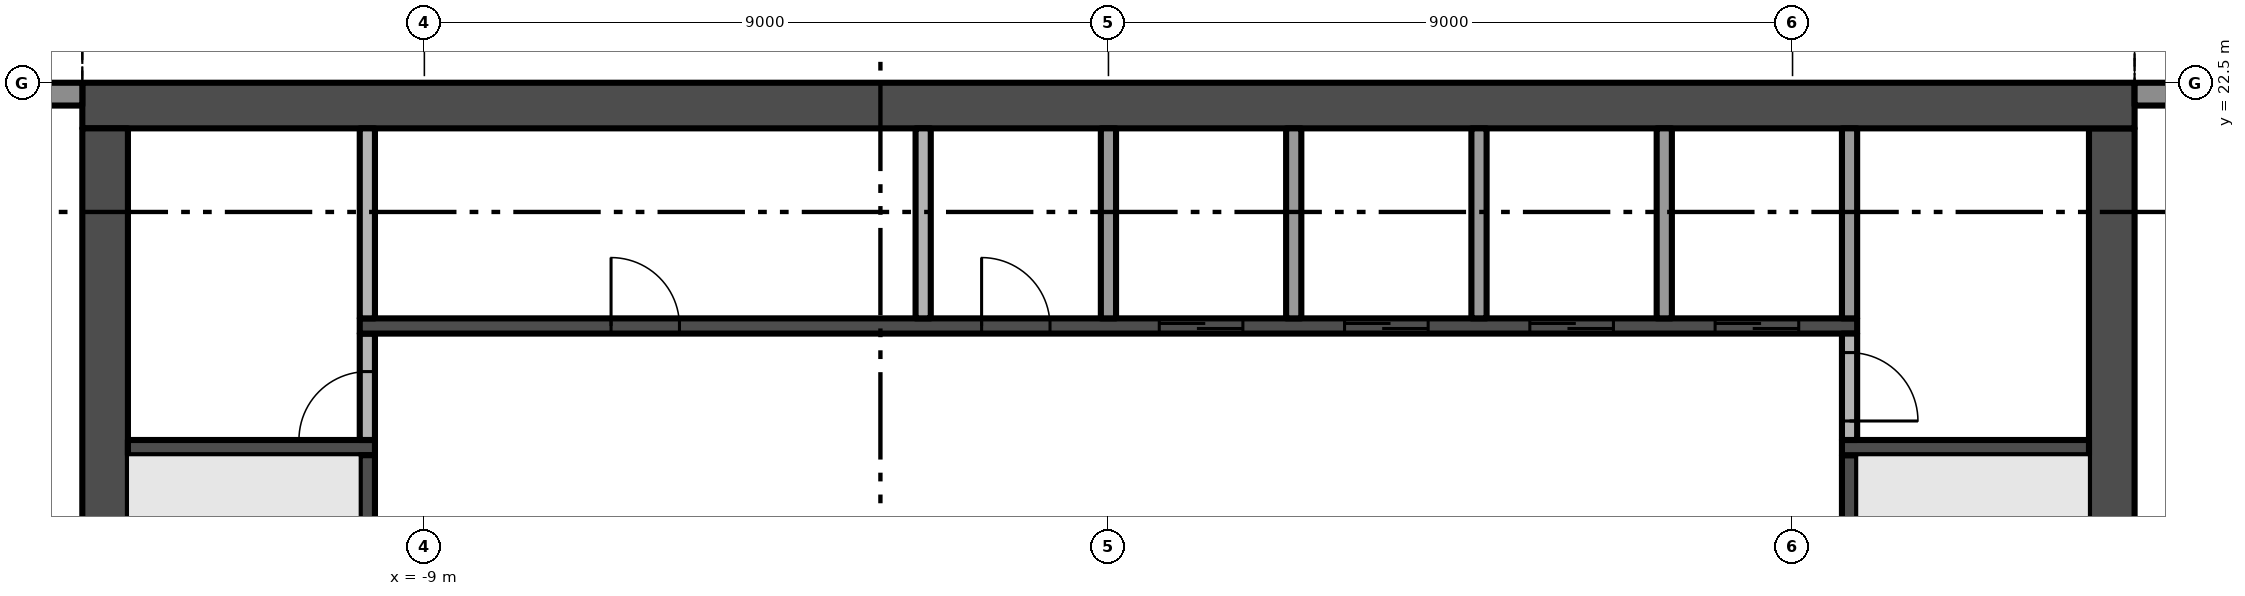
"""IFC4 building model, lengths in metres.
Left out: names, types, materials, properties, quantities, classifications, styles, units other than length and angle.
Written with IfcOpenShell. Run it as: python <this file> out.ifc"""

import sys

from ifc_helpers import new_model, si_unit, direction, frame, frame_2d, origin, place, context, subcontext, project, spatial, polyline, rectangle, outline, extrude, element, fill, save


model = new_model("IFC4")
c1 = context("Model", 3, precision=1e-05, world=origin(), true_north=direction((0.0, 1.0)))
c2 = subcontext(c1, "Body", "Model", "MODEL_VIEW")
j1 = project(units=[si_unit("LENGTHUNIT", "METRE"), si_unit("PLANEANGLEUNIT", "RADIAN")], contexts=[c1])
p1 = place(None, origin())
s1 = spatial("IfcSite", under=j1, at=p1, CompositionType="ELEMENT")
p2 = place(p1, origin())
s2 = spatial("IfcBuilding", under=s1, at=p2, CompositionType="ELEMENT")
p3 = place(p2, frame((0.0, 0.0, 280.6)))
s3 = spatial("IfcBuildingStorey", under=s2, at=p3, CompositionType="ELEMENT", Elevation=280.6)
p4 = place(p3, frame((13.2, 5.1, -0.3), z_axis=(0.0, 0.0, 1.0), x_axis=(0.0, 1.0, 0.0)))
e1 = element("IfcWall", 1, at=p4, inside=s3, PredefinedType="SHEAR", context=c2, shape_type="SweptSolid", body=[
    extrude(rectangle(XDim=16.8, YDim=0.6, at=frame_2d((8.4, 0.0))), origin(), (0.0, 0.0, 1.0), 3.8),
])
p5 = place(p4, frame((6.3, 0.0, 0.3)))
e2 = element("IfcOpeningElement", 2, at=p5, cuts=e1, PredefinedType="OPENING", context=c2, shape_type="SweptSolid", body=[
    extrude(rectangle(XDim=1.2, YDim=2.2, at=frame_2d((0.6, 1.1))), frame((0.0, 0.31, 0.0), z_axis=(0.0, -1.0, 0.0), x_axis=(1.0, 0.0, 0.0)), (0.0, 0.0, 1.0), 0.62),
])
p6 = place(p3, frame((13.5, 22.2, -0.3), z_axis=(0.0, 0.0, 1.0), x_axis=(-1.0, 0.0, 0.0)))
e3 = element("IfcWall", 3, at=p6, inside=s3, PredefinedType="SHEAR", context=c2, shape_type="SweptSolid", body=[
    extrude(rectangle(XDim=27.0, YDim=0.6, at=frame_2d((13.5, 0.0))), origin(), (0.0, 0.0, 1.0), 3.8),
])
p7 = place(p3, frame((-13.2, 21.9, -0.3), z_axis=(0.0, 0.0, 1.0), x_axis=(0.0, -1.0, 0.0)))
e4 = element("IfcWall", 4, at=p7, inside=s3, PredefinedType="SHEAR", context=c2, shape_type="SweptSolid", body=[
    extrude(rectangle(XDim=16.8, YDim=0.6, at=frame_2d((8.4, 0.0))), origin(), (0.0, 0.0, 1.0), 3.8),
])
p8 = place(p7, frame((9.3, 0.0, 0.3)))
e5 = element("IfcOpeningElement", 5, at=p8, cuts=e4, PredefinedType="OPENING", context=c2, shape_type="SweptSolid", body=[
    extrude(rectangle(XDim=1.2, YDim=2.2, at=frame_2d((0.6, 1.1))), frame((0.0, 0.31, 0.0), z_axis=(0.0, -1.0, 0.0), x_axis=(1.0, 0.0, 0.0)), (0.0, 0.0, 1.0), 0.62),
])
p9 = place(p3, frame((13.5, 22.35, 0.0), z_axis=(0.0, 0.0, 1.0), x_axis=(1.0, 0.0, 0.0)))
e6 = element("IfcWall", 6, at=p9, inside=s3, PredefinedType="SOLIDWALL", context=c2, shape_type="SweptSolid", body=[
    extrude(rectangle(XDim=4.05, YDim=0.3, at=frame_2d((2.025, 0.0))), origin(), (0.0, 0.0, 1.0), 3.5),
])
p10 = place(p9, frame((0.55, 0.0, 0.45)))
e7 = element("IfcOpeningElement", 7, at=p10, cuts=e6, PredefinedType="OPENING", context=c2, shape_type="SweptSolid", body=[
    extrude(rectangle(XDim=3.2, YDim=2.65, at=frame_2d((1.6, 1.325))), frame((0.0, 0.16, 0.0), z_axis=(0.0, -1.0, 0.0), x_axis=(1.0, 0.0, 0.0)), (0.0, 0.0, 1.0), 0.32),
])
p11 = place(p3, frame((-17.55, 22.35, 0.0), z_axis=(0.0, 0.0, 1.0), x_axis=(1.0, 0.0, 0.0)))
e8 = element("IfcWall", 8, at=p11, inside=s3, PredefinedType="SOLIDWALL", context=c2, shape_type="SweptSolid", body=[
    extrude(rectangle(XDim=4.05, YDim=0.3, at=frame_2d((2.025, 0.0))), origin(), (0.0, 0.0, 1.0), 3.5),
])
p12 = place(p11, frame((0.3, 0.0, 0.0)))
e9 = element("IfcOpeningElement", 9, at=p12, cuts=e8, PredefinedType="OPENING", context=c2, shape_type="SweptSolid", body=[
    extrude(rectangle(XDim=3.2, YDim=2.4, at=frame_2d((1.6, 1.2))), frame((0.0, 0.16, 0.0), z_axis=(0.0, -1.0, 0.0), x_axis=(1.0, 0.0, 0.0)), (0.0, 0.0, 1.0), 0.32),
])
p13 = place(p3, origin())
e10 = element("IfcWall", 10, at=p13, inside=s3, PredefinedType="USERDEFINED", context=c2, shape_type="SweptSolid", body=[
    extrude(outline(polyline([(22.5, 25.5), (21.0, 25.271), (19.5, 24.671), (18.0, 23.929), (16.5, 23.329), (15.0, 23.1), (13.5, 23.329), (13.462, 23.082), (15.0, 22.847), (16.566, 23.086), (18.102, 23.701), (19.602, 24.442), (21.066, 25.028), (22.538, 25.253), (22.5, 25.5)])), origin(), (0.0, 0.0, 1.0), 0.9),
])
p14 = place(p3, origin())
e11 = element("IfcWall", 11, at=p14, inside=s3, PredefinedType="USERDEFINED", context=c2, shape_type="SweptSolid", body=[
    extrude(outline(polyline([(-13.5, 25.5), (-15.0, 25.271), (-16.5, 24.671), (-18.0, 23.929), (-19.5, 23.329), (-21.0, 23.1), (-22.5, 23.329), (-22.538, 23.082), (-21.0, 22.847), (-19.434, 23.086), (-17.898, 23.701), (-16.398, 24.442), (-14.934, 25.028), (-13.462, 25.253), (-13.5, 25.5)])), origin(), (0.0, 0.0, 1.0), 0.9),
])
p15 = place(p3, frame((-12.9, 17.7, 0.0), z_axis=(0.0, 0.0, 1.0), x_axis=(1.0, 0.0, 0.0)))
e12 = element("IfcWall", 12, at=p15, inside=s3, PredefinedType="SHEAR", context=c2, shape_type="SweptSolid", body=[
    extrude(rectangle(XDim=3.25, YDim=0.2, at=frame_2d((1.625, 0.0))), origin(), (0.0, 0.0, 1.0), 3.5),
])
p16 = place(p3, frame((-9.75, 16.1, 0.0), z_axis=(0.0, 0.0, 1.0), x_axis=(0.0, 1.0, 0.0)))
e13 = element("IfcWall", 13, at=p16, inside=s3, PredefinedType="SHEAR", context=c2, shape_type="SweptSolid", body=[
    extrude(rectangle(XDim=1.5, YDim=0.2, at=frame_2d((0.75, 0.0))), origin(), (0.0, 0.0, 1.0), 3.5),
])
p17 = place(p3, frame((-9.75, 17.8, 0.0), z_axis=(0.0, 0.0, 1.0), x_axis=(0.0, 1.0, 0.0)))
e14 = element("IfcWall", 14, at=p17, inside=s3, PredefinedType="PARTITIONING", context=c2, shape_type="SweptSolid", body=[
    extrude(rectangle(XDim=1.4, YDim=0.2, at=frame_2d((0.7, 0.0))), origin(), (0.0, 0.0, 1.0), 3.5),
])
p18 = place(p17, origin())
e15 = element("IfcOpeningElement", 15, at=p18, cuts=e14, PredefinedType="OPENING", context=c2, shape_type="SweptSolid", body=[
    extrude(rectangle(XDim=0.9, YDim=2.1, at=frame_2d((0.45, 1.05))), frame((0.0, 0.11, 0.0), z_axis=(0.0, -1.0, 0.0), x_axis=(1.0, 0.0, 0.0)), (0.0, 0.0, 1.0), 0.22),
])
p19 = place(p3, frame((-9.85, 19.3, 0.0), z_axis=(0.0, 0.0, 1.0), x_axis=(1.0, 0.0, 0.0)))
e16 = element("IfcWall", 16, at=p19, inside=s3, PredefinedType="SHEAR", context=c2, shape_type="SweptSolid", body=[
    extrude(rectangle(XDim=19.7, YDim=0.2, at=frame_2d((9.85, 0.0))), origin(), (0.0, 0.0, 1.0), 3.5),
])
p20 = place(p19, frame((10.519, 0.0, 0.0)))
e17 = element("IfcOpeningElement", 17, at=p20, cuts=e16, PredefinedType="OPENING", context=c2, shape_type="SweptSolid", body=[
    extrude(rectangle(XDim=1.1, YDim=2.1, at=frame_2d((0.55, 1.05))), frame((0.0, 0.11, 0.0), z_axis=(0.0, -1.0, 0.0), x_axis=(1.0, 0.0, 0.0)), (0.0, 0.0, 1.0), 0.22),
])
p21 = place(p19, frame((12.956, 0.0, 0.0)))
e18 = element("IfcOpeningElement", 18, at=p21, cuts=e16, PredefinedType="OPENING", context=c2, shape_type="SweptSolid", body=[
    extrude(rectangle(XDim=1.1, YDim=2.1, at=frame_2d((0.55, 1.05))), frame((0.0, 0.11, 0.0), z_axis=(0.0, -1.0, 0.0), x_axis=(1.0, 0.0, 0.0)), (0.0, 0.0, 1.0), 0.22),
])
p22 = place(p19, frame((15.394, 0.0, 0.0)))
e19 = element("IfcOpeningElement", 19, at=p22, cuts=e16, PredefinedType="OPENING", context=c2, shape_type="SweptSolid", body=[
    extrude(rectangle(XDim=1.1, YDim=2.1, at=frame_2d((0.55, 1.05))), frame((0.0, 0.11, 0.0), z_axis=(0.0, -1.0, 0.0), x_axis=(1.0, 0.0, 0.0)), (0.0, 0.0, 1.0), 0.22),
])
p23 = place(p19, frame((17.831, 0.0, 0.0)))
e20 = element("IfcOpeningElement", 20, at=p23, cuts=e16, PredefinedType="OPENING", context=c2, shape_type="SweptSolid", body=[
    extrude(rectangle(XDim=1.1, YDim=2.1, at=frame_2d((0.55, 1.05))), frame((0.0, 0.11, 0.0), z_axis=(0.0, -1.0, 0.0), x_axis=(1.0, 0.0, 0.0)), (0.0, 0.0, 1.0), 0.22),
])
p24 = place(p19, frame((3.306, 0.0, 0.0)))
e21 = element("IfcOpeningElement", 21, at=p24, cuts=e16, PredefinedType="OPENING", context=c2, shape_type="SweptSolid", body=[
    extrude(rectangle(XDim=0.9, YDim=2.1, at=frame_2d((0.45, 1.05))), frame((0.0, 0.11, 0.0), z_axis=(0.0, -1.0, 0.0), x_axis=(1.0, 0.0, 0.0)), (0.0, 0.0, 1.0), 0.22),
])
p25 = place(p19, frame((8.181, 0.0, 0.0)))
e22 = element("IfcOpeningElement", 22, at=p25, cuts=e16, PredefinedType="OPENING", context=c2, shape_type="SweptSolid", body=[
    extrude(rectangle(XDim=0.9, YDim=2.1, at=frame_2d((0.45, 1.05))), frame((0.0, 0.11, 0.0), z_axis=(0.0, -1.0, 0.0), x_axis=(1.0, 0.0, 0.0)), (0.0, 0.0, 1.0), 0.22),
])
for number, where, z_axis, x_axis in (
    (23, (-9.75, 19.4, 0.0), (0.0, 0.0, 1.0), (0.0, 1.0, 0.0)),
    (24, (-2.438, 19.4, 0.0), (0.0, 0.0, 1.0), (0.0, 1.0, 0.0)),
    (25, (0.0, 19.4, 0.0), (0.0, 0.0, 1.0), (0.0, 1.0, 0.0)),
    (26, (2.438, 19.4, 0.0), (0.0, 0.0, 1.0), (0.0, 1.0, 0.0)),
    (27, (4.875, 19.4, 0.0), (0.0, 0.0, 1.0), (0.0, 1.0, 0.0)),
    (28, (7.312, 19.4, 0.0), (0.0, 0.0, 1.0), (0.0, 1.0, 0.0)),
):
    element("IfcWall", number, at=place(p3, frame(where, z_axis=z_axis, x_axis=x_axis)), inside=s3, PredefinedType="PARTITIONING", context=c2, shape_type="SweptSolid", body=[
        extrude(rectangle(XDim=2.5, YDim=0.2, at=frame_2d((1.25, 0.0))), origin(), (0.0, 0.0, 1.0), 3.5),
    ])
p26 = place(p3, frame((9.75, 16.1, 0.0), z_axis=(0.0, 0.0, 1.0), x_axis=(0.0, 1.0, 0.0)))
e29 = element("IfcWall", 29, at=p26, inside=s3, PredefinedType="SHEAR", context=c2, shape_type="SweptSolid", body=[
    extrude(rectangle(XDim=1.5, YDim=0.2, at=frame_2d((0.75, 0.0))), origin(), (0.0, 0.0, 1.0), 3.5),
])
p27 = place(p3, frame((9.65, 17.7, 0.0), z_axis=(0.0, 0.0, 1.0), x_axis=(1.0, 0.0, 0.0)))
e30 = element("IfcWall", 30, at=p27, inside=s3, PredefinedType="SHEAR", context=c2, shape_type="SweptSolid", body=[
    extrude(rectangle(XDim=3.25, YDim=0.2, at=frame_2d((1.625, 0.0))), origin(), (0.0, 0.0, 1.0), 3.5),
])
p28 = place(p3, frame((9.75, 19.2, 0.0), z_axis=(0.0, 0.0, 1.0), x_axis=(0.0, -1.0, 0.0)))
e31 = element("IfcWall", 31, at=p28, inside=s3, PredefinedType="PARTITIONING", context=c2, shape_type="SweptSolid", body=[
    extrude(rectangle(XDim=1.4, YDim=0.2, at=frame_2d((0.7, 0.0))), origin(), (0.0, 0.0, 1.0), 3.5),
])
p29 = place(p28, frame((0.25, 0.0, 0.0)))
e32 = element("IfcOpeningElement", 32, at=p29, cuts=e31, PredefinedType="OPENING", context=c2, shape_type="SweptSolid", body=[
    extrude(rectangle(XDim=0.9, YDim=2.1, at=frame_2d((0.45, 1.05))), frame((0.0, 0.11, 0.0), z_axis=(0.0, -1.0, 0.0), x_axis=(1.0, 0.0, 0.0)), (0.0, 0.0, 1.0), 0.22),
])
p30 = place(p3, frame((9.75, 19.4, 0.0), z_axis=(0.0, 0.0, 1.0), x_axis=(0.0, 1.0, 0.0)))
e33 = element("IfcWall", 33, at=p30, inside=s3, PredefinedType="PARTITIONING", context=c2, shape_type="SweptSolid", body=[
    extrude(rectangle(XDim=2.5, YDim=0.2, at=frame_2d((1.25, 0.0))), origin(), (0.0, 0.0, 1.0), 3.5),
])
p31 = place(p20, origin())
e34 = element("IfcDoor", 34, at=p31, inside=s3, OperationType="SLIDING_TO_RIGHT", PredefinedType="DOOR", context=c2, shape_type="SweptSolid", body=[
    extrude(rectangle(XDim=1.1, YDim=2.1, at=frame_2d((0.55, 1.05))), frame((0.0, 0.025, 0.0), z_axis=(0.0, -1.0, 0.0), x_axis=(1.0, 0.0, 0.0)), (0.0, 0.0, 1.0), 0.05),
])
fill(e17, e34)
p32 = place(p21, origin())
e35 = element("IfcDoor", 35, at=p32, inside=s3, OperationType="SLIDING_TO_RIGHT", PredefinedType="DOOR", context=c2, shape_type="SweptSolid", body=[
    extrude(rectangle(XDim=1.1, YDim=2.1, at=frame_2d((0.55, 1.05))), frame((0.0, 0.025, 0.0), z_axis=(0.0, -1.0, 0.0), x_axis=(1.0, 0.0, 0.0)), (0.0, 0.0, 1.0), 0.05),
])
fill(e18, e35)
p33 = place(p22, origin())
e36 = element("IfcDoor", 36, at=p33, inside=s3, OperationType="SLIDING_TO_RIGHT", PredefinedType="DOOR", context=c2, shape_type="SweptSolid", body=[
    extrude(rectangle(XDim=1.1, YDim=2.1, at=frame_2d((0.55, 1.05))), frame((0.0, 0.025, 0.0), z_axis=(0.0, -1.0, 0.0), x_axis=(1.0, 0.0, 0.0)), (0.0, 0.0, 1.0), 0.05),
])
fill(e19, e36)
p34 = place(p23, origin())
e37 = element("IfcDoor", 37, at=p34, inside=s3, OperationType="SLIDING_TO_RIGHT", PredefinedType="DOOR", context=c2, shape_type="SweptSolid", body=[
    extrude(rectangle(XDim=1.1, YDim=2.1, at=frame_2d((0.55, 1.05))), frame((0.0, 0.025, 0.0), z_axis=(0.0, -1.0, 0.0), x_axis=(1.0, 0.0, 0.0)), (0.0, 0.0, 1.0), 0.05),
])
fill(e20, e37)
p35 = place(p18, origin())
e38 = element("IfcDoor", 38, at=p35, inside=s3, OperationType="SINGLE_SWING_LEFT", PredefinedType="DOOR", context=c2, shape_type="SweptSolid", body=[
    extrude(rectangle(XDim=0.9, YDim=2.1, at=frame_2d((0.45, 1.05))), frame((0.0, 0.025, 0.0), z_axis=(0.0, -1.0, 0.0), x_axis=(1.0, 0.0, 0.0)), (0.0, 0.0, 1.0), 0.05),
])
fill(e15, e38)
p36 = place(p29, origin())
e39 = element("IfcDoor", 39, at=p36, inside=s3, OperationType="SINGLE_SWING_RIGHT", PredefinedType="DOOR", context=c2, shape_type="SweptSolid", body=[
    extrude(rectangle(XDim=0.9, YDim=2.1, at=frame_2d((0.45, 1.05))), frame((0.0, 0.025, 0.0), z_axis=(0.0, -1.0, 0.0), x_axis=(1.0, 0.0, 0.0)), (0.0, 0.0, 1.0), 0.05),
])
fill(e32, e39)
p37 = place(p24, origin())
e40 = element("IfcDoor", 40, at=p37, inside=s3, OperationType="SINGLE_SWING_LEFT", PredefinedType="DOOR", context=c2, shape_type="SweptSolid", body=[
    extrude(rectangle(XDim=0.9, YDim=2.1, at=frame_2d((0.45, 1.05))), frame((0.0, 0.025, 0.0), z_axis=(0.0, -1.0, 0.0), x_axis=(1.0, 0.0, 0.0)), (0.0, 0.0, 1.0), 0.05),
])
fill(e21, e40)
p38 = place(p25, origin())
e41 = element("IfcDoor", 41, at=p38, inside=s3, OperationType="SINGLE_SWING_LEFT", PredefinedType="DOOR", context=c2, shape_type="SweptSolid", body=[
    extrude(rectangle(XDim=0.9, YDim=2.1, at=frame_2d((0.45, 1.05))), frame((0.0, 0.025, 0.0), z_axis=(0.0, -1.0, 0.0), x_axis=(1.0, 0.0, 0.0)), (0.0, 0.0, 1.0), 0.05),
])
fill(e22, e41)
save(model, sys.argv[1])
